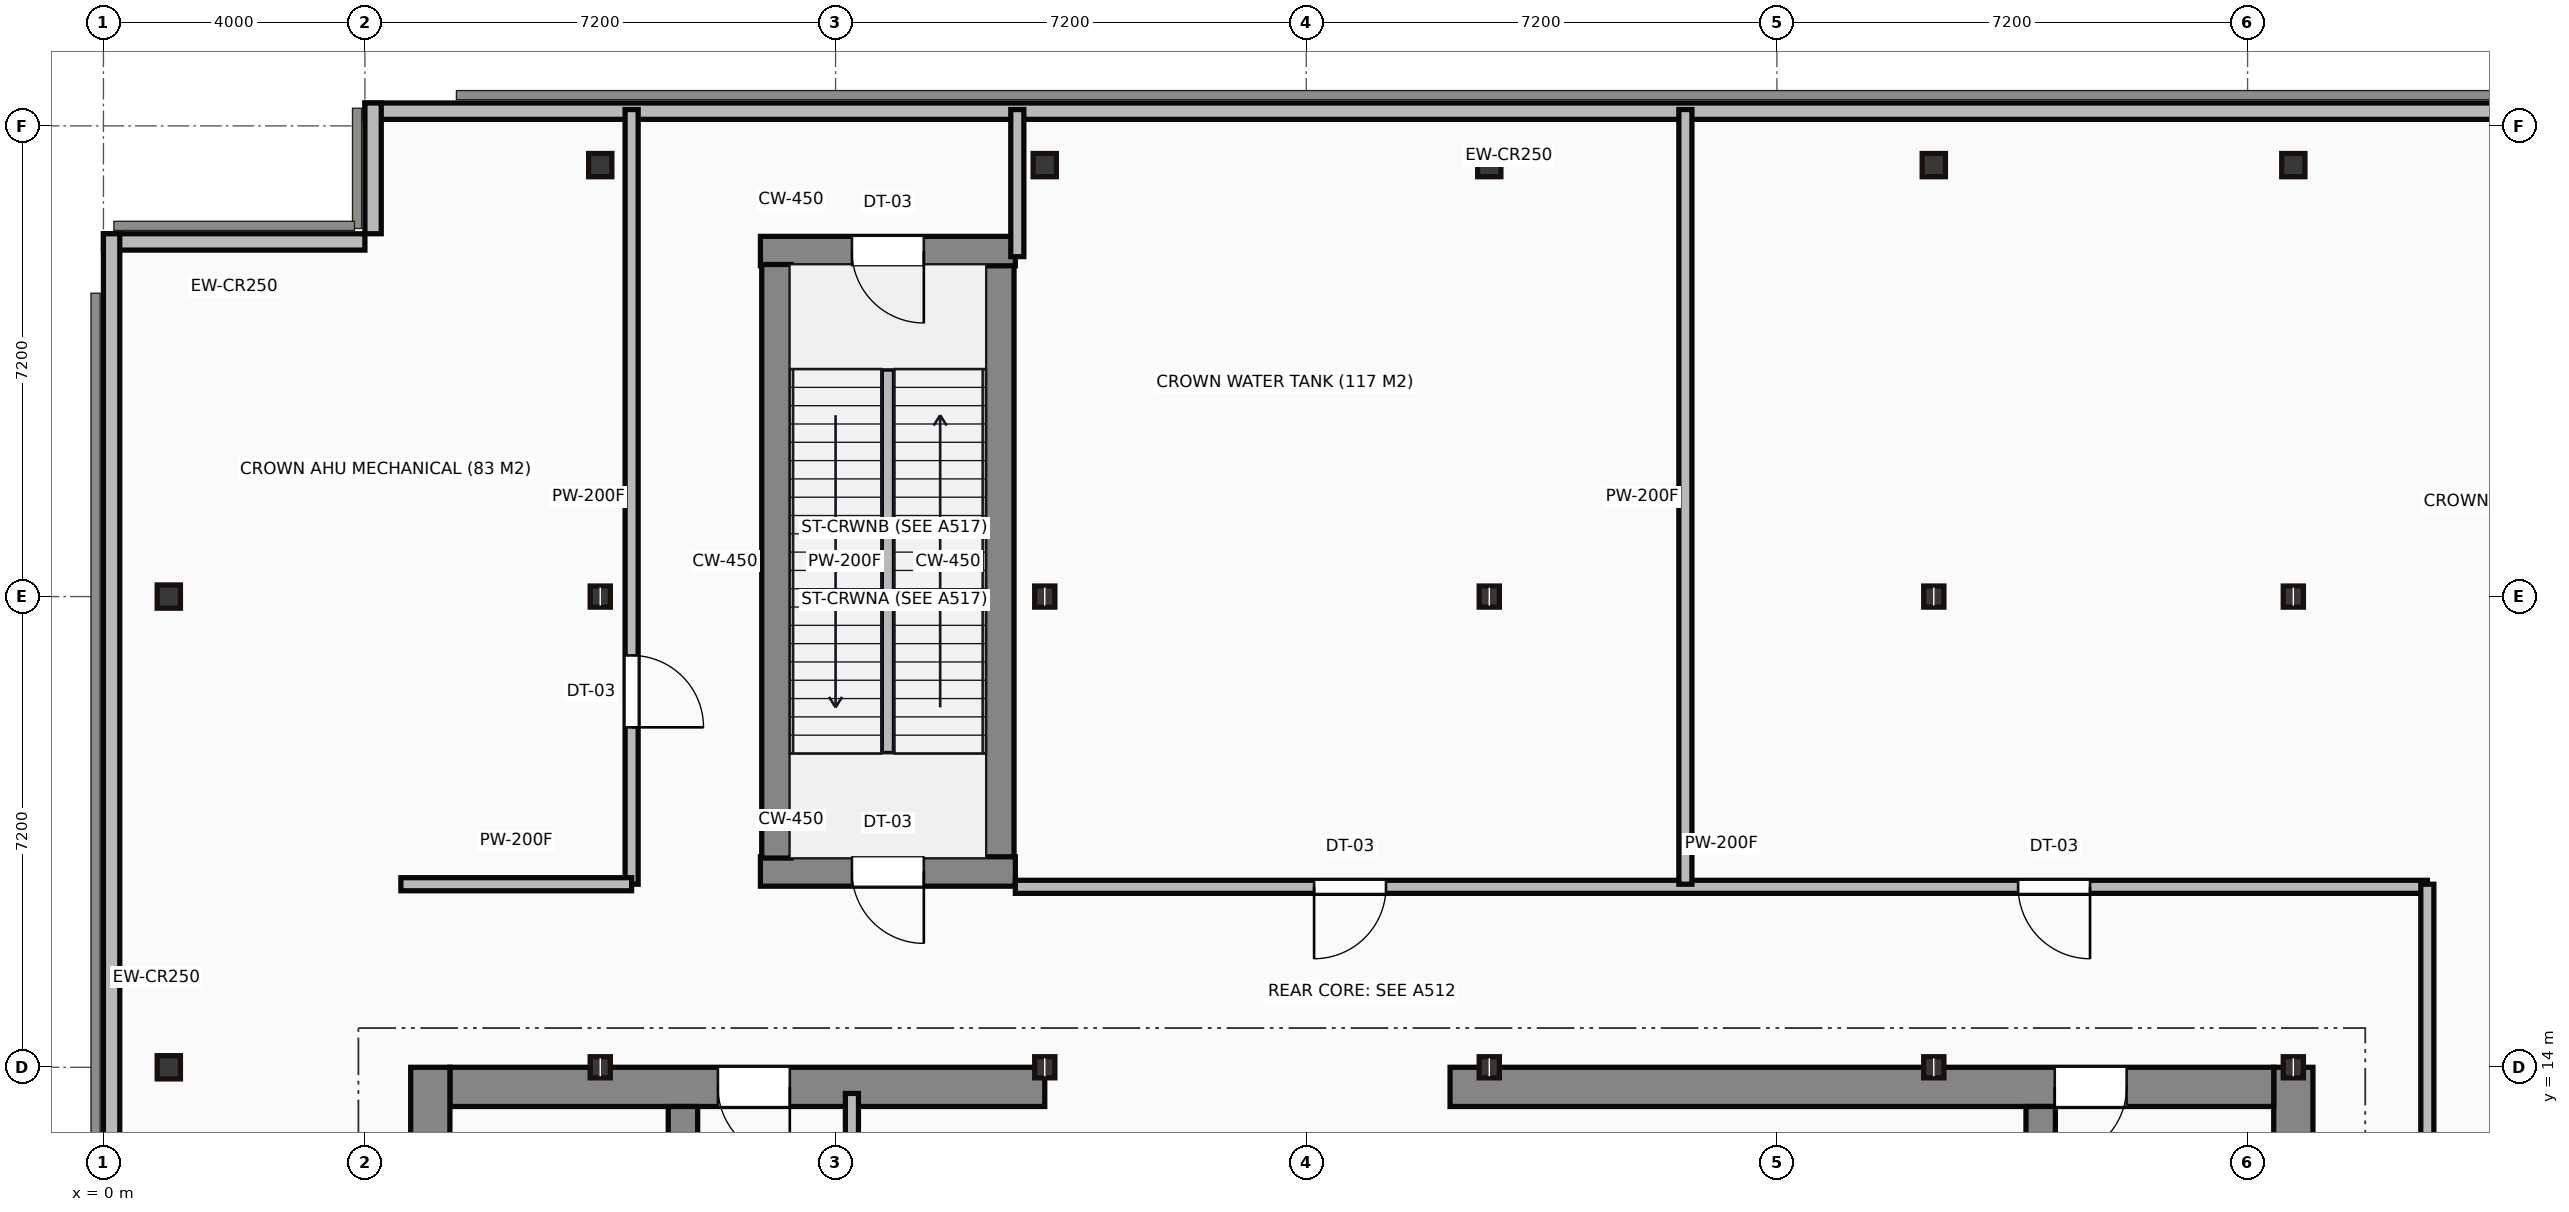
"""IFC4 building model, lengths in metres.
Left out: names, types, materials, properties, quantities, classifications, styles, units other than length and angle.
Written with IfcOpenShell. Run it as: python <this file> out.ifc"""

import sys

from ifc_helpers import new_model, si_unit, direction, frame, frame_2d, origin, origin_2d, place, context, subcontext, project, spatial, rectangle, hollow_rectangle, i_section, extrude, source, transform, mapped, element, fill, save


model = new_model("IFC4")
c1 = context("Model", 3, precision=1e-05, world=origin(), true_north=direction((0.0, 1.0)))
c2 = subcontext(c1, "Body", "Model", "MODEL_VIEW")
j1 = project(units=[si_unit("LENGTHUNIT", "METRE"), si_unit("PLANEANGLEUNIT", "RADIAN")], contexts=[c1])
p1 = place(None, origin())
s1 = spatial("IfcSite", under=j1, at=p1, CompositionType="ELEMENT")
p2 = place(p1, origin())
s2 = spatial("IfcBuilding", under=s1, at=p2, CompositionType="ELEMENT")
p3 = place(p2, frame((0.0, 0.0, 296.05)))
s3 = spatial("IfcBuildingStorey", under=s2, at=p3, CompositionType="ELEMENT", Elevation=296.05)
m1 = source(origin(), c2, "Body", "SweptSolid", [
    extrude(rectangle(XDim=13.1, YDim=0.6, at=frame_2d((6.55, 0.0))), origin(), (0.0, 0.0, 1.0), 3.8),
])
for number, where, z_axis, x_axis in (
    (1, (5.0, 0.9, 0.0), (0.0, 0.0, 1.0), (0.0, 1.0, 0.0)),
    (2, (33.5, 0.9, 0.0), (0.0, 0.0, 1.0), (0.0, 1.0, 0.0)),
):
    element("IfcWall", number, at=place(p3, frame(where, z_axis=z_axis, x_axis=x_axis)), inside=s3, PredefinedType="SHEAR", context=c2, shape_type="MappedRepresentation", body=[
        mapped(m1, transform((0.0, 0.0, 0.0))),
    ])
m2 = source(origin(), c2, "Body", "SweptSolid", [
    extrude(rectangle(XDim=9.1, YDim=0.6, at=frame_2d((4.55, 0.0))), origin(), (0.0, 0.0, 1.0), 3.8),
])
p4 = place(p3, frame((5.3, 13.7, 0.0), z_axis=(0.0, 0.0, 1.0), x_axis=(1.0, 0.0, 0.0)))
e3 = element("IfcWall", 3, at=p4, inside=s3, PredefinedType="SHEAR", context=c2, shape_type="MappedRepresentation", body=[
    mapped(m2, transform((0.0, 0.0, 0.0))),
])
p5 = place(p4, frame((4.1, 0.0, 0.0)))
e4 = element("IfcOpeningElement", 4, at=p5, cuts=e3, PredefinedType="OPENING", context=c2, shape_type="SweptSolid", body=[
    extrude(rectangle(XDim=1.1, YDim=2.15, at=frame_2d((0.55, 1.075))), frame((0.0, 0.31, 0.0), z_axis=(0.0, -1.0, 0.0), x_axis=(1.0, 0.0, 0.0)), (0.0, 0.0, 1.0), 0.62),
])
m3 = source(origin(), c2, "Body", "SweptSolid", [
    extrude(rectangle(XDim=12.6, YDim=0.6, at=frame_2d((6.3, 0.0))), origin(), (0.0, 0.0, 1.0), 3.8),
])
p6 = place(p3, frame((20.6, 13.7, 0.0), z_axis=(0.0, 0.0, 1.0), x_axis=(1.0, 0.0, 0.0)))
e5 = element("IfcWall", 5, at=p6, inside=s3, PredefinedType="SHEAR", context=c2, shape_type="MappedRepresentation", body=[
    mapped(m3, transform((0.0, 0.0, 0.0))),
])
p7 = place(p6, frame((9.25, 0.0, 0.0)))
e6 = element("IfcOpeningElement", 6, at=p7, cuts=e5, PredefinedType="OPENING", context=c2, shape_type="SweptSolid", body=[
    extrude(rectangle(XDim=1.1, YDim=2.15, at=frame_2d((0.55, 1.075))), frame((0.0, 0.31, 0.0), z_axis=(0.0, -1.0, 0.0), x_axis=(1.0, 0.0, 0.0)), (0.0, 0.0, 1.0), 0.62),
])
m4 = source(origin(), c2, "Body", "SweptSolid", [
    extrude(rectangle(XDim=12.5, YDim=0.45, at=frame_2d((6.25, 0.0))), origin(), (0.0, 0.0, 1.0), 3.8),
])
for number, where, z_axis, x_axis in (
    (7, (8.865, 0.9, 0.0), (0.0, 0.0, 1.0), (0.0, 1.0, 0.0)),
    (8, (29.635, 0.9, 0.0), (0.0, 0.0, 1.0), (0.0, 1.0, 0.0)),
):
    element("IfcWall", number, at=place(p3, frame(where, z_axis=z_axis, x_axis=x_axis)), inside=s3, PredefinedType="SHEAR", context=c2, shape_type="MappedRepresentation", body=[
        mapped(m4, transform((0.0, 0.0, 0.0))),
    ])
m5 = source(origin(), c2, "Body", "SweptSolid", [
    extrude(hollow_rectangle(XDim=0.356, YDim=0.356, WallThickness=0.019, at=origin_2d()), origin(), (0.0, 0.0, 1.0), 3.8),
])
for number, where, z_axis, x_axis in (
    (9, (1.0, 14.0, 0.0), (0.0, 0.0, 1.0), (1.0, 0.0, 0.0)),
    (10, (1.0, 21.2, 0.0), (0.0, 0.0, 1.0), (1.0, 0.0, 0.0)),
):
    element("IfcColumn", number, at=place(p3, frame(where, z_axis=z_axis, x_axis=x_axis)), inside=s3, PredefinedType="COLUMN", context=c2, shape_type="MappedRepresentation", body=[
        mapped(m5, transform((0.0, 0.0, 0.0))),
    ])
m6 = source(origin(), c2, "Body", "SweptSolid", [
    extrude(i_section(OverallWidth=0.309, OverallDepth=0.323, WebThickness=0.014, FlangeThickness=0.023, at=origin_2d()), origin(), (0.0, 0.0, 1.0), 3.8),
])
for number, where, z_axis, x_axis in (
    (11, (7.6, 14.0, 0.0), (0.0, 0.0, 1.0), (1.0, 0.0, 0.0)),
    (12, (7.6, 21.2, 0.0), (0.0, 0.0, 1.0), (1.0, 0.0, 0.0)),
):
    element("IfcColumn", number, at=place(p3, frame(where, z_axis=z_axis, x_axis=x_axis)), inside=s3, PredefinedType="COLUMN", context=c2, shape_type="MappedRepresentation", body=[
        mapped(m6, transform((0.0, 0.0, 0.0))),
    ])
p8 = place(p3, frame((7.6, 27.8, 0.0), z_axis=(0.0, 0.0, 1.0), x_axis=(1.0, 0.0, 0.0)))
e13 = element("IfcColumn", 13, at=p8, inside=s3, PredefinedType="COLUMN", context=c2, shape_type="MappedRepresentation", body=[
    mapped(m5, transform((0.0, 0.0, 0.0))),
])
for number, where, z_axis, x_axis in (
    (14, (14.4, 14.0, 0.0), (0.0, 0.0, 1.0), (1.0, 0.0, 0.0)),
    (15, (14.4, 21.2, 0.0), (0.0, 0.0, 1.0), (1.0, 0.0, 0.0)),
):
    element("IfcColumn", number, at=place(p3, frame(where, z_axis=z_axis, x_axis=x_axis)), inside=s3, PredefinedType="COLUMN", context=c2, shape_type="MappedRepresentation", body=[
        mapped(m6, transform((0.0, 0.0, 0.0))),
    ])
p9 = place(p3, frame((14.4, 27.8, 0.0), z_axis=(0.0, 0.0, 1.0), x_axis=(1.0, 0.0, 0.0)))
e16 = element("IfcColumn", 16, at=p9, inside=s3, PredefinedType="COLUMN", context=c2, shape_type="MappedRepresentation", body=[
    mapped(m5, transform((0.0, 0.0, 0.0))),
])
for number, where, z_axis, x_axis in (
    (17, (21.2, 14.0, 0.0), (0.0, 0.0, 1.0), (1.0, 0.0, 0.0)),
    (18, (21.2, 21.2, 0.0), (0.0, 0.0, 1.0), (1.0, 0.0, 0.0)),
):
    element("IfcColumn", number, at=place(p3, frame(where, z_axis=z_axis, x_axis=x_axis)), inside=s3, PredefinedType="COLUMN", context=c2, shape_type="MappedRepresentation", body=[
        mapped(m6, transform((0.0, 0.0, 0.0))),
    ])
p10 = place(p3, frame((21.2, 27.8, 0.0), z_axis=(0.0, 0.0, 1.0), x_axis=(1.0, 0.0, 0.0)))
e19 = element("IfcColumn", 19, at=p10, inside=s3, PredefinedType="COLUMN", context=c2, shape_type="MappedRepresentation", body=[
    mapped(m5, transform((0.0, 0.0, 0.0))),
])
for number, where, z_axis, x_axis in (
    (20, (28.0, 14.0, 0.0), (0.0, 0.0, 1.0), (1.0, 0.0, 0.0)),
    (21, (28.0, 21.2, 0.0), (0.0, 0.0, 1.0), (1.0, 0.0, 0.0)),
):
    element("IfcColumn", number, at=place(p3, frame(where, z_axis=z_axis, x_axis=x_axis)), inside=s3, PredefinedType="COLUMN", context=c2, shape_type="MappedRepresentation", body=[
        mapped(m6, transform((0.0, 0.0, 0.0))),
    ])
p11 = place(p3, frame((28.0, 27.8, 0.0), z_axis=(0.0, 0.0, 1.0), x_axis=(1.0, 0.0, 0.0)))
e22 = element("IfcColumn", 22, at=p11, inside=s3, PredefinedType="COLUMN", context=c2, shape_type="MappedRepresentation", body=[
    mapped(m5, transform((0.0, 0.0, 0.0))),
])
for number, where, z_axis, x_axis in (
    (23, (33.5, 14.0, 0.0), (0.0, 0.0, 1.0), (1.0, 0.0, 0.0)),
    (24, (33.5, 21.2, 0.0), (0.0, 0.0, 1.0), (1.0, 0.0, 0.0)),
):
    element("IfcColumn", number, at=place(p3, frame(where, z_axis=z_axis, x_axis=x_axis)), inside=s3, PredefinedType="COLUMN", context=c2, shape_type="MappedRepresentation", body=[
        mapped(m6, transform((0.0, 0.0, 0.0))),
    ])
p12 = place(p3, frame((33.5, 27.8, 0.0), z_axis=(0.0, 0.0, 1.0), x_axis=(1.0, 0.0, 0.0)))
e25 = element("IfcColumn", 25, at=p12, inside=s3, PredefinedType="COLUMN", context=c2, shape_type="MappedRepresentation", body=[
    mapped(m5, transform((0.0, 0.0, 0.0))),
])
m7 = source(origin(), c2, "Body", "SweptSolid", [
    extrude(rectangle(XDim=35.0, YDim=0.25, at=frame_2d((17.5, 0.0))), origin(), (0.0, 0.0, 1.0), 3.5),
])
p13 = place(p3, frame((39.0, 28.625, 0.0), z_axis=(0.0, 0.0, 1.0), x_axis=(-1.0, 0.0, 0.0)))
e26 = element("IfcWall", 26, at=p13, inside=s3, PredefinedType="STANDARD", context=c2, shape_type="MappedRepresentation", body=[
    mapped(m7, transform((0.0, 0.0, 0.0))),
])
m8 = source(origin(), c2, "Body", "SweptSolid", [
    extrude(rectangle(XDim=2.0, YDim=0.25, at=frame_2d((1.0, 0.0))), origin(), (0.0, 0.0, 1.0), 3.5),
])
p14 = place(p3, frame((4.125, 28.75, 0.0), z_axis=(0.0, 0.0, 1.0), x_axis=(0.0, -1.0, 0.0)))
e27 = element("IfcWall", 27, at=p14, inside=s3, PredefinedType="STANDARD", context=c2, shape_type="MappedRepresentation", body=[
    mapped(m8, transform((0.0, 0.0, 0.0))),
])
m9 = source(origin(), c2, "Body", "SweptSolid", [
    extrude(rectangle(XDim=4.0, YDim=0.25, at=frame_2d((2.0, 0.0))), origin(), (0.0, 0.0, 1.0), 3.5),
])
p15 = place(p3, frame((4.0, 26.625, 0.0), z_axis=(0.0, 0.0, 1.0), x_axis=(-1.0, 0.0, 0.0)))
e28 = element("IfcWall", 28, at=p15, inside=s3, PredefinedType="STANDARD", context=c2, shape_type="MappedRepresentation", body=[
    mapped(m9, transform((0.0, 0.0, 0.0))),
])
m10 = source(origin(), c2, "Body", "SweptSolid", [
    extrude(rectangle(XDim=22.75, YDim=0.25, at=frame_2d((11.375, 0.0))), origin(), (0.0, 0.0, 1.0), 3.5),
])
p16 = place(p3, frame((0.125, 26.75, 0.0), z_axis=(0.0, 0.0, 1.0), x_axis=(0.0, -1.0, 0.0)))
e29 = element("IfcWall", 29, at=p16, inside=s3, PredefinedType="STANDARD", context=c2, shape_type="MappedRepresentation", body=[
    mapped(m10, transform((0.0, 0.0, 0.0))),
])
m11 = source(origin(), c2, "Body", "SweptSolid", [
    extrude(rectangle(XDim=3.9, YDim=0.45, at=frame_2d((1.95, 0.0))), origin(), (0.0, 0.0, 1.0), 3.8),
])
p17 = place(p3, frame((10.05, 16.995, 0.0), z_axis=(0.0, 0.0, 1.0), x_axis=(1.0, 0.0, 0.0)))
e30 = element("IfcWall", 30, at=p17, inside=s3, PredefinedType="SHEAR", context=c2, shape_type="MappedRepresentation", body=[
    mapped(m11, transform((0.0, 0.0, 0.0))),
])
p18 = place(p17, frame((1.4, 0.0, 0.0)))
e31 = element("IfcOpeningElement", 31, at=p18, cuts=e30, PredefinedType="OPENING", context=c2, shape_type="SweptSolid", body=[
    extrude(rectangle(XDim=1.1, YDim=2.15, at=frame_2d((0.55, 1.075))), frame((0.0, 0.235, 0.0), z_axis=(0.0, -1.0, 0.0), x_axis=(1.0, 0.0, 0.0)), (0.0, 0.0, 1.0), 0.47),
])
m12 = source(origin(), c2, "Body", "SweptSolid", [
    extrude(rectangle(XDim=9.08, YDim=0.45, at=frame_2d((4.54, 0.0))), origin(), (0.0, 0.0, 1.0), 3.8),
])
for number, where, z_axis, x_axis in (
    (32, (10.295, 17.2, 0.0), (0.0, 0.0, 1.0), (0.0, 1.0, 0.0)),
    (33, (13.705, 17.2, 0.0), (0.0, 0.0, 1.0), (0.0, 1.0, 0.0)),
):
    element("IfcWall", number, at=place(p3, frame(where, z_axis=z_axis, x_axis=x_axis)), inside=s3, PredefinedType="SHEAR", context=c2, shape_type="MappedRepresentation", body=[
        mapped(m12, transform((0.0, 0.0, 0.0))),
    ])
p19 = place(p3, frame((10.05, 26.485, 0.0), z_axis=(0.0, 0.0, 1.0), x_axis=(1.0, 0.0, 0.0)))
e34 = element("IfcWall", 34, at=p19, inside=s3, PredefinedType="SHEAR", context=c2, shape_type="MappedRepresentation", body=[
    mapped(m11, transform((0.0, 0.0, 0.0))),
])
p20 = place(p19, frame((1.4, 0.0, 0.0)))
e35 = element("IfcOpeningElement", 35, at=p20, cuts=e34, PredefinedType="OPENING", context=c2, shape_type="SweptSolid", body=[
    extrude(rectangle(XDim=1.1, YDim=2.15, at=frame_2d((0.55, 1.075))), frame((0.0, 0.235, 0.0), z_axis=(0.0, -1.0, 0.0), x_axis=(1.0, 0.0, 0.0)), (0.0, 0.0, 1.0), 0.47),
])
m13 = source(origin(), c2, "Body", "SweptSolid", [
    extrude(rectangle(XDim=5.88, YDim=0.2, at=frame_2d((2.94, 0.0))), origin(), (0.0, 0.0, 1.0), 3.08),
])
p21 = place(p3, frame((12.0, 18.8, 0.0), z_axis=(0.0, 0.0, 1.0), x_axis=(0.0, 1.0, 0.0)))
e36 = element("IfcWall", 36, at=p21, inside=s3, PredefinedType="PARTITIONING", context=c2, shape_type="MappedRepresentation", body=[
    mapped(m13, transform((0.0, 0.0, 0.0))),
])
m14 = source(origin(), c2, "Body", "SweptSolid", [
    extrude(rectangle(XDim=3.18, YDim=0.2, at=frame_2d((1.59, 0.0))), origin(), (0.0, 0.0, 1.0), 3.5),
])
p22 = place(p3, frame((11.45, 10.42, 0.0), z_axis=(0.0, 0.0, 1.0), x_axis=(0.0, 1.0, 0.0)))
e37 = element("IfcWall", 37, at=p22, inside=s3, PredefinedType="PARTITIONING", context=c2, shape_type="MappedRepresentation", body=[
    mapped(m14, transform((0.0, 0.0, 0.0))),
])
m15 = source(origin(), c2, "Body", "SweptSolid", [
    extrude(rectangle(XDim=11.85, YDim=0.2, at=frame_2d((5.925, 0.0))), origin(), (0.0, 0.0, 1.0), 3.5),
])
p23 = place(p3, frame((8.08, 16.8, 0.0), z_axis=(0.0, 0.0, 1.0), x_axis=(0.0, 1.0, 0.0)))
e38 = element("IfcWall", 38, at=p23, inside=s3, PredefinedType="PARTITIONING", context=c2, shape_type="MappedRepresentation", body=[
    mapped(m15, transform((0.0, 0.0, 0.0))),
])
p24 = place(p23, frame((2.4, 0.0, 0.0)))
e39 = element("IfcOpeningElement", 39, at=p24, cuts=e38, PredefinedType="OPENING", context=c2, shape_type="SweptSolid", body=[
    extrude(rectangle(XDim=1.1, YDim=2.15, at=frame_2d((0.55, 1.075))), frame((0.0, 0.11, 0.0), z_axis=(0.0, -1.0, 0.0), x_axis=(1.0, 0.0, 0.0)), (0.0, 0.0, 1.0), 0.22),
])
m16 = source(origin(), c2, "Body", "SweptSolid", [
    extrude(rectangle(XDim=3.53, YDim=0.2, at=frame_2d((1.765, 0.0))), origin(), (0.0, 0.0, 1.0), 3.5),
])
p25 = place(p3, frame((4.55, 16.8, 0.0), z_axis=(0.0, 0.0, 1.0), x_axis=(1.0, 0.0, 0.0)))
e40 = element("IfcWall", 40, at=p25, inside=s3, PredefinedType="PARTITIONING", context=c2, shape_type="MappedRepresentation", body=[
    mapped(m16, transform((0.0, 0.0, 0.0))),
])
m17 = source(origin(), c2, "Body", "SweptSolid", [
    extrude(rectangle(XDim=21.6, YDim=0.2, at=frame_2d((10.8, 0.0))), origin(), (0.0, 0.0, 1.0), 3.5),
])
p26 = place(p3, frame((13.95, 16.76, 0.0), z_axis=(0.0, 0.0, 1.0), x_axis=(1.0, 0.0, 0.0)))
e41 = element("IfcWall", 41, at=p26, inside=s3, PredefinedType="PARTITIONING", context=c2, shape_type="MappedRepresentation", body=[
    mapped(m17, transform((0.0, 0.0, 0.0))),
])
p27 = place(p26, frame((4.57, 0.0, 0.0)))
e42 = element("IfcOpeningElement", 42, at=p27, cuts=e41, PredefinedType="OPENING", context=c2, shape_type="SweptSolid", body=[
    extrude(rectangle(XDim=1.1, YDim=2.15, at=frame_2d((0.55, 1.075))), frame((0.0, 0.11, 0.0), z_axis=(0.0, -1.0, 0.0), x_axis=(1.0, 0.0, 0.0)), (0.0, 0.0, 1.0), 0.22),
])
p28 = place(p26, frame((15.34, 0.0, 0.0)))
e43 = element("IfcOpeningElement", 43, at=p28, cuts=e41, PredefinedType="OPENING", context=c2, shape_type="SweptSolid", body=[
    extrude(rectangle(XDim=1.1, YDim=2.15, at=frame_2d((0.55, 1.075))), frame((0.0, 0.11, 0.0), z_axis=(0.0, -1.0, 0.0), x_axis=(1.0, 0.0, 0.0)), (0.0, 0.0, 1.0), 0.22),
])
m18 = source(origin(), c2, "Body", "SweptSolid", [
    extrude(rectangle(XDim=11.25, YDim=0.2, at=frame_2d((5.625, 0.0))), origin(), (0.0, 0.0, 1.0), 3.5),
])
p29 = place(p3, frame((35.55, 5.55, 0.0), z_axis=(0.0, 0.0, 1.0), x_axis=(0.0, 1.0, 0.0)))
e44 = element("IfcWall", 44, at=p29, inside=s3, PredefinedType="PARTITIONING", context=c2, shape_type="MappedRepresentation", body=[
    mapped(m18, transform((0.0, 0.0, 0.0))),
])
m19 = source(origin(), c2, "Body", "SweptSolid", [
    extrude(rectangle(XDim=2.25, YDim=0.2, at=frame_2d((1.125, 0.0))), origin(), (0.0, 0.0, 1.0), 3.5),
])
p30 = place(p3, frame((13.98, 26.4, 0.0), z_axis=(0.0, 0.0, 1.0), x_axis=(0.0, 1.0, 0.0)))
e45 = element("IfcWall", 45, at=p30, inside=s3, PredefinedType="PARTITIONING", context=c2, shape_type="MappedRepresentation", body=[
    mapped(m19, transform((0.0, 0.0, 0.0))),
])
p31 = place(p3, frame((24.2, 16.8, 0.0), z_axis=(0.0, 0.0, 1.0), x_axis=(0.0, 1.0, 0.0)))
e46 = element("IfcWall", 46, at=p31, inside=s3, PredefinedType="PARTITIONING", context=c2, shape_type="MappedRepresentation", body=[
    mapped(m15, transform((0.0, 0.0, 0.0))),
])
m20 = source(origin(), c2, "Body", "SweptSolid", [
    extrude(rectangle(XDim=1.1, YDim=2.15, at=frame_2d((0.55, 1.075))), frame((0.0, 0.025, 0.0), z_axis=(0.0, -1.0, 0.0), x_axis=(1.0, 0.0, 0.0)), (0.0, 0.0, 1.0), 0.05),
])
p32 = place(p5, origin())
e47 = element("IfcDoor", 47, at=p32, inside=s3, OperationType="SINGLE_SWING_RIGHT", PredefinedType="DOOR", context=c2, shape_type="MappedRepresentation", body=[
    mapped(m20, transform((0.0, 0.0, 0.0))),
])
fill(e4, e47)
p33 = place(p7, origin())
e48 = element("IfcDoor", 48, at=p33, inside=s3, OperationType="SINGLE_SWING_LEFT", PredefinedType="DOOR", context=c2, shape_type="MappedRepresentation", body=[
    mapped(m20, transform((0.0, 0.0, 0.0))),
])
fill(e6, e48)
p34 = place(p24, frame((1.1, 0.0, 0.0), z_axis=(0.0, 0.0, 1.0), x_axis=(-1.0, 0.0, 0.0)))
e49 = element("IfcDoor", 49, at=p34, inside=s3, OperationType="SINGLE_SWING_LEFT", PredefinedType="DOOR", context=c2, shape_type="MappedRepresentation", body=[
    mapped(m20, transform((0.0, 0.0, 0.0))),
])
fill(e39, e49)
p35 = place(p27, origin())
e50 = element("IfcDoor", 50, at=p35, inside=s3, OperationType="SINGLE_SWING_LEFT", PredefinedType="DOOR", context=c2, shape_type="MappedRepresentation", body=[
    mapped(m20, transform((0.0, 0.0, 0.0))),
])
fill(e42, e50)
p36 = place(p28, origin())
e51 = element("IfcDoor", 51, at=p36, inside=s3, OperationType="SINGLE_SWING_RIGHT", PredefinedType="DOOR", context=c2, shape_type="MappedRepresentation", body=[
    mapped(m20, transform((0.0, 0.0, 0.0))),
])
fill(e43, e51)
p37 = place(p18, origin())
e52 = element("IfcDoor", 52, at=p37, inside=s3, OperationType="SINGLE_SWING_RIGHT", PredefinedType="DOOR", context=c2, shape_type="MappedRepresentation", body=[
    mapped(m20, transform((0.0, 0.0, 0.0))),
])
fill(e31, e52)
p38 = place(p20, frame((1.1, 0.0, 0.0), z_axis=(0.0, 0.0, 1.0), x_axis=(-1.0, 0.0, 0.0)))
e53 = element("IfcDoor", 53, at=p38, inside=s3, OperationType="SINGLE_SWING_RIGHT", PredefinedType="DOOR", context=c2, shape_type="MappedRepresentation", body=[
    mapped(m20, transform((0.0, 0.0, 0.0))),
])
fill(e35, e53)
save(model, sys.argv[1])
